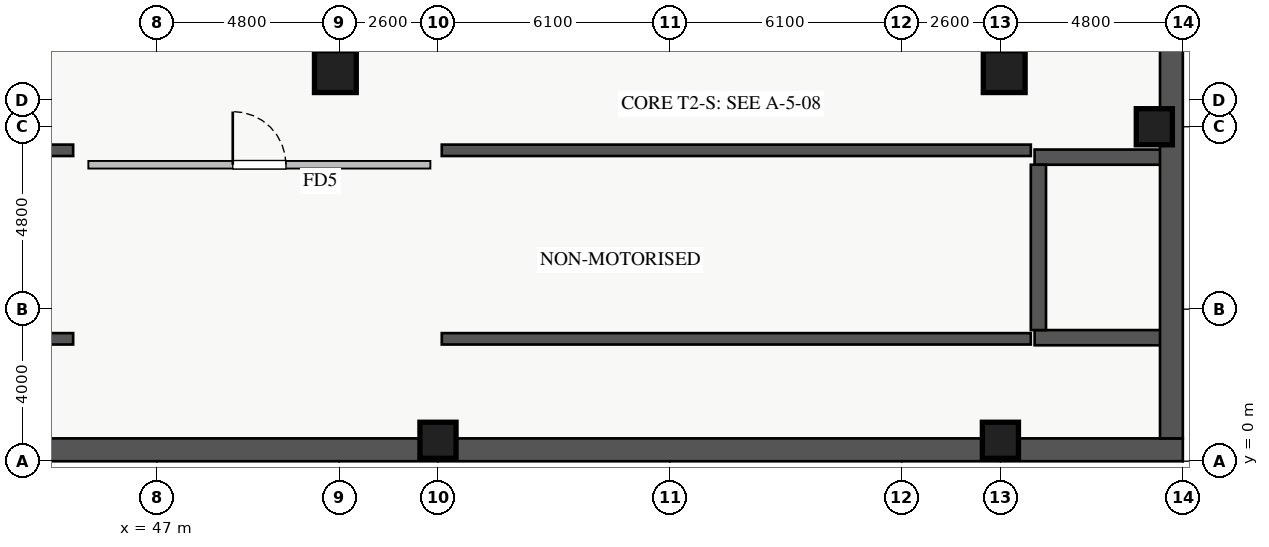
"""IFC4 building model, lengths in metres.
Left out: names, types, materials, properties, quantities, classifications, styles, units other than length and angle.
Written with IfcOpenShell. Run it as: python <this file> out.ifc"""

import sys

from ifc_helpers import new_model, si_unit, direction, frame, frame_2d, origin, origin_2d, place, context, subcontext, project, spatial, rectangle, extrude, source, transform, mapped, element, fill, save


model = new_model("IFC4")
c1 = context("Model", 3, precision=1e-05, world=origin(), true_north=direction((0.0, 1.0)))
c2 = subcontext(c1, "Body", "Model", "MODEL_VIEW")
j1 = project(units=[si_unit("LENGTHUNIT", "METRE"), si_unit("PLANEANGLEUNIT", "RADIAN")], contexts=[c1])
p1 = place(None, origin())
s1 = spatial("IfcSite", under=j1, at=p1, CompositionType="ELEMENT")
p2 = place(p1, origin())
s2 = spatial("IfcBuilding", under=s1, at=p2, CompositionType="ELEMENT")
p3 = place(p2, frame((0.0, 0.0, -9.6)))
s3 = spatial("IfcBuildingStorey", under=s2, at=p3, CompositionType="ELEMENT", Elevation=-9.6)
for number, where, z_axis, x_axis in (
    (1, (70.1, 3.25, 0.0), (0.0, 0.0, 1.0), (1.0, 0.0, 0.0)),
    (2, (70.1, 8.0, 0.0), (0.0, 0.0, 1.0), (1.0, 0.0, 0.0)),
):
    element("IfcWall", number, at=place(p3, frame(where, z_axis=z_axis, x_axis=x_axis)), inside=s3, PredefinedType="SOLIDWALL", context=c2, shape_type="SweptSolid", body=[
        extrude(rectangle(XDim=3.4, YDim=0.4, at=frame_2d((1.7, 0.0))), origin(), (0.0, 0.0, 1.0), 4.8),
    ])
p4 = place(p3, frame((70.2, 3.45, 0.0), z_axis=(0.0, 0.0, 1.0), x_axis=(0.0, 1.0, 0.0)))
e3 = element("IfcWall", 3, at=p4, inside=s3, PredefinedType="SOLIDWALL", context=c2, shape_type="SweptSolid", body=[
    extrude(rectangle(XDim=4.35, YDim=0.4, at=frame_2d((2.175, 0.0))), origin(), (0.0, 0.0, 1.0), 4.8),
])
p5 = place(p3, frame((0.0, 0.3, 0.0), z_axis=(0.0, 0.0, 1.0), x_axis=(1.0, 0.0, 0.0)))
e4 = element("IfcWall", 4, at=p5, inside=s3, PredefinedType="SOLIDWALL", context=c2, shape_type="SweptSolid", body=[
    extrude(rectangle(XDim=74.0, YDim=0.6, at=frame_2d((37.0, 0.0))), origin(), (0.0, 0.0, 1.0), 4.8),
])
p6 = place(p3, frame((73.7, 0.6, 0.0), z_axis=(0.0, 0.0, 1.0), x_axis=(0.0, 1.0, 0.0)))
e5 = element("IfcWall", 5, at=p6, inside=s3, PredefinedType="SOLIDWALL", context=c2, shape_type="SweptSolid", body=[
    extrude(rectangle(XDim=44.8, YDim=0.6, at=frame_2d((22.4, 0.0))), origin(), (0.0, 0.0, 1.0), 4.8),
])
m1 = source(origin(), c2, "Body", "SweptSolid", [
    extrude(rectangle(XDim=1.1, YDim=1.1, at=origin_2d()), origin(), (0.0, 0.0, 1.0), 4.8),
])
for number, where, z_axis, x_axis in (
    (6, (51.7, 10.25, 0.0), (0.0, 0.0, 1.0), (1.0, 0.0, 0.0)),
    (7, (69.3, 10.25, 0.0), (0.0, 0.0, 1.0), (1.0, 0.0, 0.0)),
):
    element("IfcColumn", number, at=place(p3, frame(where, z_axis=z_axis, x_axis=x_axis)), inside=s3, PredefinedType="COLUMN", context=c2, shape_type="MappedRepresentation", body=[
        mapped(m1, transform((0.0, 0.0, 0.0), x_axis=(1.0, 0.0, 0.0), y_axis=(0.0, 1.0, 0.0), z_axis=(0.0, 0.0, 1.0), scale=1.0)),
    ])
m2 = source(origin(), c2, "Body", "SweptSolid", [
    extrude(rectangle(XDim=0.95, YDim=0.95, at=origin_2d()), origin(), (0.0, 0.0, 1.0), 4.8),
])
for number, where, z_axis, x_axis in (
    (8, (54.4, 0.55, 0.0), (0.0, 0.0, 1.0), (1.0, 0.0, 0.0)),
    (9, (69.2, 0.55, 0.0), (0.0, 0.0, 1.0), (1.0, 0.0, 0.0)),
    (10, (73.25, 8.8, 0.0), (0.0, 0.0, 1.0), (1.0, 0.0, 0.0)),
):
    element("IfcColumn", number, at=place(p3, frame(where, z_axis=z_axis, x_axis=x_axis)), inside=s3, PredefinedType="COLUMN", context=c2, shape_type="MappedRepresentation", body=[
        mapped(m2, transform((0.0, 0.0, 0.0), x_axis=(1.0, 0.0, 0.0), y_axis=(0.0, 1.0, 0.0), z_axis=(0.0, 0.0, 1.0), scale=1.0)),
    ])
p7 = place(p3, frame((45.2, 7.8, 0.0), z_axis=(0.0, 0.0, 1.0), x_axis=(1.0, 0.0, 0.0)))
e11 = element("IfcWall", 11, at=p7, inside=s3, PredefinedType="PARTITIONING", context=c2, shape_type="SweptSolid", body=[
    extrude(rectangle(XDim=9.0, YDim=0.2, at=frame_2d((4.5, 0.0))), origin(), (0.0, 0.0, 1.0), 4.58),
])
p8 = place(p7, frame((3.8, 0.0, 0.0)))
e12 = element("IfcOpeningElement", 12, at=p8, cuts=e11, PredefinedType="OPENING", context=c2, shape_type="SweptSolid", body=[
    extrude(rectangle(XDim=1.4, YDim=2.05, at=frame_2d((0.7, 1.025))), frame((0.0, 0.11, 0.0), z_axis=(0.0, -1.0, 0.0), x_axis=(1.0, 0.0, 0.0)), (0.0, 0.0, 1.0), 0.22),
])
p9 = place(p3, frame((39.2, 3.22, 0.0), z_axis=(0.0, 0.0, 1.0), x_axis=(1.0, 0.0, 0.0)))
e13 = element("IfcWall", 13, at=p9, inside=s3, PredefinedType="SOLIDWALL", context=c2, shape_type="SweptSolid", body=[
    extrude(rectangle(XDim=5.6, YDim=0.3, at=frame_2d((2.8, 0.0))), origin(), (0.0, 0.0, 1.0), 4.8),
])
p10 = place(p3, frame((54.5, 3.22, 0.0), z_axis=(0.0, 0.0, 1.0), x_axis=(1.0, 0.0, 0.0)))
e14 = element("IfcWall", 14, at=p10, inside=s3, PredefinedType="SOLIDWALL", context=c2, shape_type="SweptSolid", body=[
    extrude(rectangle(XDim=15.5, YDim=0.3, at=frame_2d((7.75, 0.0))), origin(), (0.0, 0.0, 1.0), 4.8),
])
p11 = place(p3, frame((39.2, 8.18, 0.0), z_axis=(0.0, 0.0, 1.0), x_axis=(1.0, 0.0, 0.0)))
e15 = element("IfcWall", 15, at=p11, inside=s3, PredefinedType="SOLIDWALL", context=c2, shape_type="SweptSolid", body=[
    extrude(rectangle(XDim=5.6, YDim=0.3, at=frame_2d((2.8, 0.0))), origin(), (0.0, 0.0, 1.0), 4.8),
])
p12 = place(p3, frame((54.5, 8.18, 0.0), z_axis=(0.0, 0.0, 1.0), x_axis=(1.0, 0.0, 0.0)))
e16 = element("IfcWall", 16, at=p12, inside=s3, PredefinedType="SOLIDWALL", context=c2, shape_type="SweptSolid", body=[
    extrude(rectangle(XDim=15.5, YDim=0.3, at=frame_2d((7.75, 0.0))), origin(), (0.0, 0.0, 1.0), 4.8),
])
m3 = source(origin(), c2, "Body", "SweptSolid", [
    extrude(rectangle(XDim=1.4, YDim=2.05, at=frame_2d((0.7, 1.025))), frame((0.0, 0.025, 0.0), z_axis=(0.0, -1.0, 0.0), x_axis=(1.0, 0.0, 0.0)), (0.0, 0.0, 1.0), 0.05),
])
p13 = place(p8, origin())
e17 = element("IfcDoor", 17, at=p13, inside=s3, OperationType="SINGLE_SWING_LEFT", PredefinedType="DOOR", context=c2, shape_type="MappedRepresentation", body=[
    mapped(m3, transform((0.0, 0.0, 0.0), x_axis=(1.0, 0.0, 0.0), y_axis=(0.0, 1.0, 0.0), z_axis=(0.0, 0.0, 1.0), scale=1.0)),
])
fill(e12, e17)
save(model, sys.argv[1])
